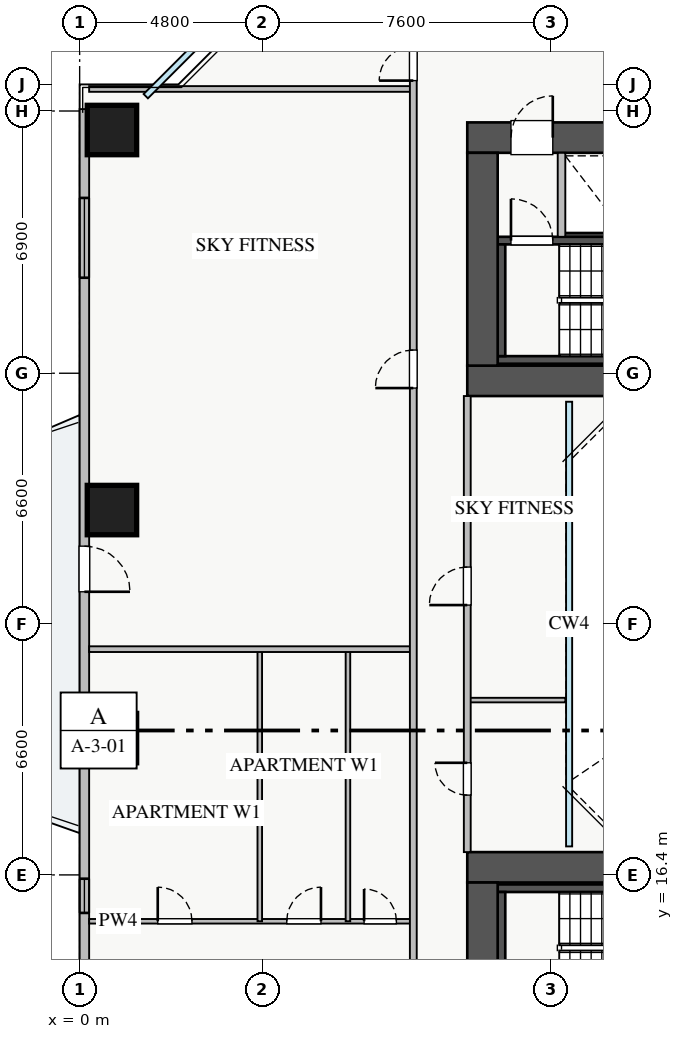
"""IFC4 building model, lengths in metres.
Left out: names, types, materials, properties, quantities, classifications, styles, units other than length and angle.
Written with IfcOpenShell. Run it as: python <this file> out.ifc"""

import sys

from ifc_helpers import new_model, si_unit, direction, frame, frame_2d, origin, origin_2d, place, context, subcontext, project, spatial, rectangle, extrude, source, transform, mapped, element, fill, save


model = new_model("IFC4")
c1 = context("Model", 3, precision=1e-05, world=origin(), true_north=direction((0.0, 1.0)))
c2 = subcontext(c1, "Body", "Model", "MODEL_VIEW")
j1 = project(units=[si_unit("LENGTHUNIT", "METRE"), si_unit("PLANEANGLEUNIT", "RADIAN")], contexts=[c1])
p1 = place(None, origin())
s1 = spatial("IfcSite", under=j1, at=p1, CompositionType="ELEMENT")
p2 = place(p1, origin())
s2 = spatial("IfcBuilding", under=s1, at=p2, CompositionType="ELEMENT")
p3 = place(p2, frame((0.0, 0.0, 23.0)))
s3 = spatial("IfcBuildingStorey", under=s2, at=p3, CompositionType="ELEMENT", Elevation=23.0)
p4 = place(p3, frame((12.68, 33.2, 0.0), z_axis=(0.0, 0.0, 1.0), x_axis=(1.0, 0.0, 0.0)))
e1 = element("IfcWall", 1, at=p4, inside=s3, PredefinedType="SHEAR", context=c2, shape_type="SweptSolid", body=[
    extrude(rectangle(XDim=1.94, YDim=0.18, at=frame_2d((0.97, 0.0))), origin(), (0.0, 0.0, 1.0), 3.07),
])
p5 = place(p3, frame((11.0, 29.95, 0.0), z_axis=(0.0, 0.0, 1.0), x_axis=(1.0, 0.0, 0.0)))
e2 = element("IfcWall", 2, at=p5, inside=s3, PredefinedType="SHEAR", context=c2, shape_type="SweptSolid", body=[
    extrude(rectangle(XDim=7.15, YDim=0.2, at=frame_2d((3.575, 0.0))), origin(), (0.0, 0.0, 1.0), 3.25),
])
p6 = place(p3, frame((11.0, 33.09, 0.0), z_axis=(0.0, 0.0, 1.0), x_axis=(1.0, 0.0, 0.0)))
e3 = element("IfcWall", 3, at=p6, inside=s3, PredefinedType="SHEAR", context=c2, shape_type="SweptSolid", body=[
    extrude(rectangle(XDim=7.15, YDim=0.2, at=frame_2d((3.575, 0.0))), origin(), (0.0, 0.0, 1.0), 3.25),
])
p7 = place(p6, frame((0.35, 0.0, 0.0)))
e4 = element("IfcOpeningElement", 4, at=p7, cuts=e3, PredefinedType="OPENING", context=c2, shape_type="SweptSolid", body=[
    extrude(rectangle(XDim=1.1, YDim=2.05, at=frame_2d((0.55, 1.025))), frame((0.0, 0.11, 0.0), z_axis=(0.0, -1.0, 0.0), x_axis=(1.0, 0.0, 0.0)), (0.0, 0.0, 1.0), 0.22),
])
p8 = place(p3, frame((11.1, 30.05, 0.0), z_axis=(0.0, 0.0, 1.0), x_axis=(0.0, 1.0, 0.0)))
e5 = element("IfcWall", 5, at=p8, inside=s3, PredefinedType="SHEAR", context=c2, shape_type="SweptSolid", body=[
    extrude(rectangle(XDim=2.94, YDim=0.2, at=frame_2d((1.47, 0.0))), origin(), (0.0, 0.0, 1.0), 3.25),
])
p9 = place(p3, frame((11.0, 16.05, 0.0), z_axis=(0.0, 0.0, 1.0), x_axis=(1.0, 0.0, 0.0)))
e6 = element("IfcWall", 6, at=p9, inside=s3, PredefinedType="SHEAR", context=c2, shape_type="SweptSolid", body=[
    extrude(rectangle(XDim=7.15, YDim=0.2, at=frame_2d((3.575, 0.0))), origin(), (0.0, 0.0, 1.0), 3.25),
])
p10 = place(p3, frame((11.1, 13.01, 0.0), z_axis=(0.0, 0.0, 1.0), x_axis=(0.0, 1.0, 0.0)))
e7 = element("IfcWall", 7, at=p10, inside=s3, PredefinedType="SHEAR", context=c2, shape_type="SweptSolid", body=[
    extrude(rectangle(XDim=2.94, YDim=0.2, at=frame_2d((1.47, 0.0))), origin(), (0.0, 0.0, 1.0), 3.25),
])
p11 = place(p3, frame((10.2, 29.4, 0.0), z_axis=(0.0, 0.0, 1.0), x_axis=(1.0, 0.0, 0.0)))
e8 = element("IfcWall", 8, at=p11, inside=s3, PredefinedType="SHEAR", context=c2, shape_type="SweptSolid", body=[
    extrude(rectangle(XDim=17.6, YDim=0.8, at=frame_2d((8.8, 0.0))), origin(), (0.0, 0.0, 1.0), 3.25),
])
p12 = place(p3, frame((10.2, 35.8, 0.0), z_axis=(0.0, 0.0, 1.0), x_axis=(1.0, 0.0, 0.0)))
e9 = element("IfcWall", 9, at=p12, inside=s3, PredefinedType="SHEAR", context=c2, shape_type="SweptSolid", body=[
    extrude(rectangle(XDim=17.6, YDim=0.8, at=frame_2d((8.8, 0.0))), origin(), (0.0, 0.0, 1.0), 3.25),
])
p13 = place(p12, frame((1.15, 0.0, 0.0)))
e10 = element("IfcOpeningElement", 10, at=p13, cuts=e9, PredefinedType="OPENING", context=c2, shape_type="SweptSolid", body=[
    extrude(rectangle(XDim=1.1, YDim=2.05, at=frame_2d((0.55, 1.025))), frame((0.0, 0.41, 0.0), z_axis=(0.0, -1.0, 0.0), x_axis=(1.0, 0.0, 0.0)), (0.0, 0.0, 1.0), 0.82),
])
p14 = place(p12, frame((8.3, 0.0, 0.0)))
e11 = element("IfcOpeningElement", 11, at=p14, cuts=e9, PredefinedType="OPENING", context=c2, shape_type="SweptSolid", body=[
    extrude(rectangle(XDim=1.1, YDim=2.05, at=frame_2d((0.55, 1.025))), frame((0.0, 0.41, 0.0), z_axis=(0.0, -1.0, 0.0), x_axis=(1.0, 0.0, 0.0)), (0.0, 0.0, 1.0), 0.82),
])
p15 = place(p12, frame((10.05, 0.0, 0.0)))
e12 = element("IfcOpeningElement", 12, at=p15, cuts=e9, PredefinedType="OPENING", context=c2, shape_type="SweptSolid", body=[
    extrude(rectangle(XDim=1.1, YDim=2.05, at=frame_2d((0.55, 1.025))), frame((0.0, 0.41, 0.0), z_axis=(0.0, -1.0, 0.0), x_axis=(1.0, 0.0, 0.0)), (0.0, 0.0, 1.0), 0.82),
])
p16 = place(p12, frame((14.74, 0.0, 0.0)))
e13 = element("IfcOpeningElement", 13, at=p16, cuts=e9, PredefinedType="OPENING", context=c2, shape_type="SweptSolid", body=[
    extrude(rectangle(XDim=1.0, YDim=2.05, at=frame_2d((0.5, 1.025))), frame((0.0, 0.41, 0.0), z_axis=(0.0, -1.0, 0.0), x_axis=(1.0, 0.0, 0.0)), (0.0, 0.0, 1.0), 0.82),
])
p17 = place(p12, frame((11.95, 0.0, 0.0)))
e14 = element("IfcOpeningElement", 14, at=p17, cuts=e9, PredefinedType="OPENING", context=c2, shape_type="SweptSolid", body=[
    extrude(rectangle(XDim=1.0, YDim=2.05, at=frame_2d((0.5, 1.025))), frame((0.0, 0.41, 0.0), z_axis=(0.0, -1.0, 0.0), x_axis=(1.0, 0.0, 0.0)), (0.0, 0.0, 1.0), 0.82),
])
p18 = place(p12, frame((13.485, 0.0, 0.0)))
e15 = element("IfcOpeningElement", 15, at=p18, cuts=e9, PredefinedType="OPENING", context=c2, shape_type="SweptSolid", body=[
    extrude(rectangle(XDim=1.0, YDim=2.05, at=frame_2d((0.5, 1.025))), frame((0.0, 0.41, 0.0), z_axis=(0.0, -1.0, 0.0), x_axis=(1.0, 0.0, 0.0)), (0.0, 0.0, 1.0), 0.82),
])
p19 = place(p3, frame((10.6, 29.8, 0.0), z_axis=(0.0, 0.0, 1.0), x_axis=(0.0, 1.0, 0.0)))
e16 = element("IfcWall", 16, at=p19, inside=s3, PredefinedType="SHEAR", context=c2, shape_type="SweptSolid", body=[
    extrude(rectangle(XDim=5.6, YDim=0.8, at=frame_2d((2.8, 0.0))), origin(), (0.0, 0.0, 1.0), 3.25),
])
p20 = place(p3, frame((10.2, 16.6, 0.0), z_axis=(0.0, 0.0, 1.0), x_axis=(1.0, 0.0, 0.0)))
e17 = element("IfcWall", 17, at=p20, inside=s3, PredefinedType="SHEAR", context=c2, shape_type="SweptSolid", body=[
    extrude(rectangle(XDim=17.6, YDim=0.8, at=frame_2d((8.8, 0.0))), origin(), (0.0, 0.0, 1.0), 3.25),
])
p21 = place(p3, frame((10.6, 10.6, 0.0), z_axis=(0.0, 0.0, 1.0), x_axis=(0.0, 1.0, 0.0)))
e18 = element("IfcWall", 18, at=p21, inside=s3, PredefinedType="SHEAR", context=c2, shape_type="SweptSolid", body=[
    extrude(rectangle(XDim=5.6, YDim=0.8, at=frame_2d((2.8, 0.0))), origin(), (0.0, 0.0, 1.0), 3.25),
])
m1 = source(origin(), c2, "Body", "SweptSolid", [
    extrude(rectangle(XDim=1.3, YDim=1.3, at=origin_2d()), origin(), (0.0, 0.0, 1.0), 3.25),
])
for number, where, z_axis, x_axis in (
    (19, (0.85, 36.0, 0.0), (0.0, 0.0, 1.0), (1.0, 0.0, 0.0)),
    (20, (0.85, 26.0, 0.0), (0.0, 0.0, 1.0), (1.0, 0.0, 0.0)),
    (21, (0.85, 20.0, 0.0), (0.0, 0.0, 1.0), (1.0, 0.0, 0.0)),
):
    element("IfcColumn", number, at=place(p3, frame(where, z_axis=z_axis, x_axis=x_axis)), inside=s3, PredefinedType="COLUMN", context=c2, shape_type="MappedRepresentation", body=[
        mapped(m1, transform((0.0, 0.0, 0.0), x_axis=(1.0, 0.0, 0.0), y_axis=(0.0, 1.0, 0.0), z_axis=(0.0, 0.0, 1.0), scale=1.0)),
    ])
p22 = place(p3, frame((0.125, 9.45, 0.0), z_axis=(0.0, 0.0, 1.0), x_axis=(0.0, 1.0, 0.0)))
e22 = element("IfcWall", 22, at=p22, inside=s3, PredefinedType="STANDARD", context=c2, shape_type="SweptSolid", body=[
    extrude(rectangle(XDim=27.1, YDim=0.25, at=frame_2d((13.55, 0.0))), origin(), (0.0, 0.0, 1.0), 2.61),
])
p23 = place(p22, frame((14.4, 0.0, 0.0)))
e23 = element("IfcOpeningElement", 23, at=p23, cuts=e22, PredefinedType="OPENING", context=c2, shape_type="SweptSolid", body=[
    extrude(rectangle(XDim=1.2, YDim=2.1, at=frame_2d((0.6, 1.05))), frame((0.0, 0.135, 0.0), z_axis=(0.0, -1.0, 0.0), x_axis=(1.0, 0.0, 0.0)), (0.0, 0.0, 1.0), 0.27),
])
p24 = place(p22, frame((2.188, 0.0, 0.9)))
e24 = element("IfcOpeningElement", 24, at=p24, cuts=e22, PredefinedType="OPENING", context=c2, shape_type="SweptSolid", body=[
    extrude(rectangle(XDim=2.4, YDim=1.48, at=frame_2d((1.2, 0.74))), frame((0.0, 0.135, 0.0), z_axis=(0.0, -1.0, 0.0), x_axis=(1.0, 0.0, 0.0)), (0.0, 0.0, 1.0), 0.27),
])
p25 = place(p22, frame((22.663, 0.0, 0.9)))
e25 = element("IfcOpeningElement", 25, at=p25, cuts=e22, PredefinedType="OPENING", context=c2, shape_type="SweptSolid", body=[
    extrude(rectangle(XDim=2.1, YDim=1.48, at=frame_2d((1.05, 0.74))), frame((0.0, 0.135, 0.0), z_axis=(0.0, -1.0, 0.0), x_axis=(1.0, 0.0, 0.0)), (0.0, 0.0, 1.0), 0.27),
])
p26 = place(p22, frame((5.95, 0.0, 0.9)))
e26 = element("IfcOpeningElement", 26, at=p26, cuts=e22, PredefinedType="OPENING", context=c2, shape_type="SweptSolid", body=[
    extrude(rectangle(XDim=0.9, YDim=1.2, at=frame_2d((0.45, 0.6))), frame((0.0, 0.135, 0.0), z_axis=(0.0, -1.0, 0.0), x_axis=(1.0, 0.0, 0.0)), (0.0, 0.0, 1.0), 0.27),
])
p27 = place(p3, frame((12.68, 33.19, 0.0), z_axis=(0.0, 0.0, 1.0), x_axis=(0.0, 1.0, 0.0)))
e27 = element("IfcWall", 27, at=p27, inside=s3, PredefinedType="PARTITIONING", context=c2, shape_type="SweptSolid", body=[
    extrude(rectangle(XDim=2.21, YDim=0.2, at=frame_2d((1.105, 0.0))), origin(), (0.0, 0.0, 1.0), 3.07),
])
p28 = place(p3, frame((0.25, 37.08, 0.0), z_axis=(0.0, 0.0, 1.0), x_axis=(1.0, 0.0, 0.0)))
e28 = element("IfcWall", 28, at=p28, inside=s3, PredefinedType="PARTITIONING", context=c2, shape_type="SweptSolid", body=[
    extrude(rectangle(XDim=8.53, YDim=0.15, at=frame_2d((4.265, 0.0))), origin(), (0.0, 0.0, 1.0), 3.07),
])
p29 = place(p3, frame((0.25, 15.18, 0.0), z_axis=(0.0, 0.0, 1.0), x_axis=(1.0, 0.0, 0.0)))
e29 = element("IfcWall", 29, at=p29, inside=s3, PredefinedType="PLUMBINGWALL", context=c2, shape_type="SweptSolid", body=[
    extrude(rectangle(XDim=8.53, YDim=0.12, at=frame_2d((4.265, 0.0))), origin(), (0.0, 0.0, 1.0), 3.07),
])
p30 = place(p29, frame((1.805, 0.0, 0.0)))
e30 = element("IfcOpeningElement", 30, at=p30, cuts=e29, PredefinedType="OPENING", context=c2, shape_type="SweptSolid", body=[
    extrude(rectangle(XDim=0.9, YDim=2.05, at=frame_2d((0.45, 1.025))), frame((0.0, 0.07, 0.0), z_axis=(0.0, -1.0, 0.0), x_axis=(1.0, 0.0, 0.0)), (0.0, 0.0, 1.0), 0.14),
])
p31 = place(p29, frame((5.2, 0.0, 0.0)))
e31 = element("IfcOpeningElement", 31, at=p31, cuts=e29, PredefinedType="OPENING", context=c2, shape_type="SweptSolid", body=[
    extrude(rectangle(XDim=0.9, YDim=2.05, at=frame_2d((0.45, 1.025))), frame((0.0, 0.07, 0.0), z_axis=(0.0, -1.0, 0.0), x_axis=(1.0, 0.0, 0.0)), (0.0, 0.0, 1.0), 0.14),
])
p32 = place(p29, frame((7.235, 0.0, 0.0)))
e32 = element("IfcOpeningElement", 32, at=p32, cuts=e29, PredefinedType="OPENING", context=c2, shape_type="SweptSolid", body=[
    extrude(rectangle(XDim=0.85, YDim=2.05, at=frame_2d((0.425, 1.025))), frame((0.0, 0.07, 0.0), z_axis=(0.0, -1.0, 0.0), x_axis=(1.0, 0.0, 0.0)), (0.0, 0.0, 1.0), 0.14),
])
for number, where, z_axis, x_axis in (
    (33, (4.74, 15.18, 0.0), (0.0, 0.0, 1.0), (0.0, 1.0, 0.0)),
    (34, (7.06, 15.18, 0.0), (0.0, 0.0, 1.0), (0.0, 1.0, 0.0)),
):
    element("IfcWall", number, at=place(p3, frame(where, z_axis=z_axis, x_axis=x_axis)), inside=s3, PredefinedType="PLUMBINGWALL", context=c2, shape_type="SweptSolid", body=[
        extrude(rectangle(XDim=7.16, YDim=0.12, at=frame_2d((3.58, 0.0))), origin(), (0.0, 0.0, 1.0), 3.07),
    ])
p33 = place(p3, frame((0.25, 22.34, 0.0), z_axis=(0.0, 0.0, 1.0), x_axis=(1.0, 0.0, 0.0)))
e35 = element("IfcWall", 35, at=p33, inside=s3, PredefinedType="PARTITIONING", context=c2, shape_type="SweptSolid", body=[
    extrude(rectangle(XDim=8.53, YDim=0.15, at=frame_2d((4.265, 0.0))), origin(), (0.0, 0.0, 1.0), 3.07),
])
p34 = place(p3, frame((8.78, 7.21, 0.0), z_axis=(0.0, 0.0, 1.0), x_axis=(0.0, 1.0, 0.0)))
e36 = element("IfcWall", 36, at=p34, inside=s3, PredefinedType="PARTITIONING", context=c2, shape_type="SweptSolid", body=[
    extrude(rectangle(XDim=31.23, YDim=0.18, at=frame_2d((15.615, 0.0))), origin(), (0.0, 0.0, 1.0), 3.07),
])
p35 = place(p34, frame((30.09, 0.0, 0.0)))
e37 = element("IfcOpeningElement", 37, at=p35, cuts=e36, PredefinedType="OPENING", context=c2, shape_type="SweptSolid", body=[
    extrude(rectangle(XDim=0.9, YDim=2.05, at=frame_2d((0.45, 1.025))), frame((0.0, 0.1, 0.0), z_axis=(0.0, -1.0, 0.0), x_axis=(1.0, 0.0, 0.0)), (0.0, 0.0, 1.0), 0.2),
])
p36 = place(p34, frame((0.24, 0.0, 0.0)))
e38 = element("IfcOpeningElement", 38, at=p36, cuts=e36, PredefinedType="OPENING", context=c2, shape_type="SweptSolid", body=[
    extrude(rectangle(XDim=0.9, YDim=2.05, at=frame_2d((0.45, 1.025))), frame((0.0, 0.1, 0.0), z_axis=(0.0, -1.0, 0.0), x_axis=(1.0, 0.0, 0.0)), (0.0, 0.0, 1.0), 0.2),
])
p37 = place(p34, frame((3.975, 0.0, 0.0)))
e39 = element("IfcOpeningElement", 39, at=p37, cuts=e36, PredefinedType="OPENING", context=c2, shape_type="SweptSolid", body=[
    extrude(rectangle(XDim=1.0, YDim=2.05, at=frame_2d((0.5, 1.025))), frame((0.0, 0.1, 0.0), z_axis=(0.0, -1.0, 0.0), x_axis=(1.0, 0.0, 0.0)), (0.0, 0.0, 1.0), 0.2),
])
p38 = place(p34, frame((22.0, 0.0, 0.0)))
e40 = element("IfcOpeningElement", 40, at=p38, cuts=e36, PredefinedType="OPENING", context=c2, shape_type="SweptSolid", body=[
    extrude(rectangle(XDim=1.0, YDim=2.05, at=frame_2d((0.5, 1.025))), frame((0.0, 0.1, 0.0), z_axis=(0.0, -1.0, 0.0), x_axis=(1.0, 0.0, 0.0)), (0.0, 0.0, 1.0), 0.2),
])
p39 = place(p3, frame((10.2, 21.0, 0.0), z_axis=(0.0, 0.0, 1.0), x_axis=(1.0, 0.0, 0.0)))
e41 = element("IfcWall", 41, at=p39, inside=s3, PredefinedType="PLUMBINGWALL", context=c2, shape_type="SweptSolid", body=[
    extrude(rectangle(XDim=2.58, YDim=0.12, at=frame_2d((1.29, 0.0))), origin(), (0.0, 0.0, 1.0), 3.07),
])
p40 = place(p3, frame((10.2, 17.0, 0.0), z_axis=(0.0, 0.0, 1.0), x_axis=(0.0, 1.0, 0.0)))
e42 = element("IfcWall", 42, at=p40, inside=s3, PredefinedType="PARTITIONING", context=c2, shape_type="SweptSolid", body=[
    extrude(rectangle(XDim=12.0, YDim=0.18, at=frame_2d((6.0, 0.0))), origin(), (0.0, 0.0, 1.0), 3.07),
])
p41 = place(p40, frame((1.5, 0.0, 0.0)))
e43 = element("IfcOpeningElement", 43, at=p41, cuts=e42, PredefinedType="OPENING", context=c2, shape_type="SweptSolid", body=[
    extrude(rectangle(XDim=0.85, YDim=2.05, at=frame_2d((0.425, 1.025))), frame((0.0, 0.1, 0.0), z_axis=(0.0, -1.0, 0.0), x_axis=(1.0, 0.0, 0.0)), (0.0, 0.0, 1.0), 0.2),
])
p42 = place(p40, frame((6.5, 0.0, 0.0)))
e44 = element("IfcOpeningElement", 44, at=p42, cuts=e42, PredefinedType="OPENING", context=c2, shape_type="SweptSolid", body=[
    extrude(rectangle(XDim=1.0, YDim=2.05, at=frame_2d((0.5, 1.025))), frame((0.0, 0.1, 0.0), z_axis=(0.0, -1.0, 0.0), x_axis=(1.0, 0.0, 0.0)), (0.0, 0.0, 1.0), 0.2),
])
m2 = source(origin(), c2, "Body", "SweptSolid", [
    extrude(rectangle(XDim=1.2, YDim=2.1, at=frame_2d((0.6, 1.05))), frame((0.0, 0.025, 0.0), z_axis=(0.0, -1.0, 0.0), x_axis=(1.0, 0.0, 0.0)), (0.0, 0.0, 1.0), 0.05),
])
p43 = place(p23, frame((1.2, 0.0, 0.0), z_axis=(0.0, 0.0, 1.0), x_axis=(-1.0, 0.0, 0.0)))
e45 = element("IfcDoor", 45, at=p43, inside=s3, OperationType="SINGLE_SWING_LEFT", PredefinedType="DOOR", context=c2, shape_type="MappedRepresentation", body=[
    mapped(m2, transform((0.0, 0.0, 0.0), x_axis=(1.0, 0.0, 0.0), y_axis=(0.0, 1.0, 0.0), z_axis=(0.0, 0.0, 1.0), scale=1.0)),
])
fill(e23, e45)
m3 = source(origin(), c2, "Body", "SweptSolid", [
    extrude(rectangle(XDim=2.1, YDim=1.48, at=frame_2d((1.05, 0.74))), frame((0.0, 0.03, 0.0), z_axis=(0.0, -1.0, 0.0), x_axis=(1.0, 0.0, 0.0)), (0.0, 0.0, 1.0), 0.06),
])
p44 = place(p25, origin())
e46 = element("IfcWindow", 46, at=p44, inside=s3, PartitioningType="TRIPLE_PANEL_VERTICAL", PredefinedType="WINDOW", context=c2, shape_type="MappedRepresentation", body=[
    mapped(m3, transform((0.0, 0.0, 0.0), x_axis=(1.0, 0.0, 0.0), y_axis=(0.0, 1.0, 0.0), z_axis=(0.0, 0.0, 1.0), scale=1.0)),
])
fill(e25, e46)
m4 = source(origin(), c2, "Body", "SweptSolid", [
    extrude(rectangle(XDim=1.1, YDim=2.05, at=frame_2d((0.55, 1.025))), frame((0.0, 0.025, 0.0), z_axis=(0.0, -1.0, 0.0), x_axis=(1.0, 0.0, 0.0)), (0.0, 0.0, 1.0), 0.05),
])
p45 = place(p13, origin())
e47 = element("IfcDoor", 47, at=p45, inside=s3, OperationType="SINGLE_SWING_RIGHT", PredefinedType="DOOR", context=c2, shape_type="MappedRepresentation", body=[
    mapped(m4, transform((0.0, 0.0, 0.0), x_axis=(1.0, 0.0, 0.0), y_axis=(0.0, 1.0, 0.0), z_axis=(0.0, 0.0, 1.0), scale=1.0)),
])
fill(e10, e47)
p46 = place(p7, origin())
e48 = element("IfcDoor", 48, at=p46, inside=s3, OperationType="SINGLE_SWING_LEFT", PredefinedType="DOOR", context=c2, shape_type="MappedRepresentation", body=[
    mapped(m4, transform((0.0, 0.0, 0.0), x_axis=(1.0, 0.0, 0.0), y_axis=(0.0, 1.0, 0.0), z_axis=(0.0, 0.0, 1.0), scale=1.0)),
])
fill(e4, e48)
m5 = source(origin(), c2, "Body", "SweptSolid", [
    extrude(rectangle(XDim=0.9, YDim=2.05, at=frame_2d((0.45, 1.025))), frame((0.0, 0.025, 0.0), z_axis=(0.0, -1.0, 0.0), x_axis=(1.0, 0.0, 0.0)), (0.0, 0.0, 1.0), 0.05),
])
p47 = place(p30, origin())
e49 = element("IfcDoor", 49, at=p47, inside=s3, OperationType="SINGLE_SWING_LEFT", PredefinedType="DOOR", context=c2, shape_type="MappedRepresentation", body=[
    mapped(m5, transform((0.0, 0.0, 0.0), x_axis=(1.0, 0.0, 0.0), y_axis=(0.0, 1.0, 0.0), z_axis=(0.0, 0.0, 1.0), scale=1.0)),
])
fill(e30, e49)
p48 = place(p31, origin())
e50 = element("IfcDoor", 50, at=p48, inside=s3, OperationType="SINGLE_SWING_RIGHT", PredefinedType="DOOR", context=c2, shape_type="MappedRepresentation", body=[
    mapped(m5, transform((0.0, 0.0, 0.0), x_axis=(1.0, 0.0, 0.0), y_axis=(0.0, 1.0, 0.0), z_axis=(0.0, 0.0, 1.0), scale=1.0)),
])
fill(e31, e50)
m6 = source(origin(), c2, "Body", "SweptSolid", [
    extrude(rectangle(XDim=0.85, YDim=2.05, at=frame_2d((0.425, 1.025))), frame((0.0, 0.025, 0.0), z_axis=(0.0, -1.0, 0.0), x_axis=(1.0, 0.0, 0.0)), (0.0, 0.0, 1.0), 0.05),
])
p49 = place(p32, origin())
e51 = element("IfcDoor", 51, at=p49, inside=s3, OperationType="SINGLE_SWING_LEFT", PredefinedType="DOOR", context=c2, shape_type="MappedRepresentation", body=[
    mapped(m6, transform((0.0, 0.0, 0.0), x_axis=(1.0, 0.0, 0.0), y_axis=(0.0, 1.0, 0.0), z_axis=(0.0, 0.0, 1.0), scale=1.0)),
])
fill(e32, e51)
p50 = place(p35, origin())
e52 = element("IfcDoor", 52, at=p50, inside=s3, OperationType="SINGLE_SWING_LEFT", PredefinedType="DOOR", context=c2, shape_type="MappedRepresentation", body=[
    mapped(m5, transform((0.0, 0.0, 0.0), x_axis=(1.0, 0.0, 0.0), y_axis=(0.0, 1.0, 0.0), z_axis=(0.0, 0.0, 1.0), scale=1.0)),
])
fill(e37, e52)
m7 = source(origin(), c2, "Body", "SweptSolid", [
    extrude(rectangle(XDim=1.0, YDim=2.05, at=frame_2d((0.5, 1.025))), frame((0.0, 0.025, 0.0), z_axis=(0.0, -1.0, 0.0), x_axis=(1.0, 0.0, 0.0)), (0.0, 0.0, 1.0), 0.05),
])
p51 = place(p38, origin())
e53 = element("IfcDoor", 53, at=p51, inside=s3, OperationType="SINGLE_SWING_LEFT", PredefinedType="DOOR", context=c2, shape_type="MappedRepresentation", body=[
    mapped(m7, transform((0.0, 0.0, 0.0), x_axis=(1.0, 0.0, 0.0), y_axis=(0.0, 1.0, 0.0), z_axis=(0.0, 0.0, 1.0), scale=1.0)),
])
fill(e40, e53)
p52 = place(p41, origin())
e54 = element("IfcDoor", 54, at=p52, inside=s3, OperationType="SINGLE_SWING_RIGHT", PredefinedType="DOOR", context=c2, shape_type="MappedRepresentation", body=[
    mapped(m6, transform((0.0, 0.0, 0.0), x_axis=(1.0, 0.0, 0.0), y_axis=(0.0, 1.0, 0.0), z_axis=(0.0, 0.0, 1.0), scale=1.0)),
])
fill(e43, e54)
p53 = place(p42, origin())
e55 = element("IfcDoor", 55, at=p53, inside=s3, OperationType="SINGLE_SWING_LEFT", PredefinedType="DOOR", context=c2, shape_type="MappedRepresentation", body=[
    mapped(m7, transform((0.0, 0.0, 0.0), x_axis=(1.0, 0.0, 0.0), y_axis=(0.0, 1.0, 0.0), z_axis=(0.0, 0.0, 1.0), scale=1.0)),
])
fill(e44, e55)
m8 = source(origin(), c2, "Body", "SweptSolid", [
    extrude(rectangle(XDim=0.9, YDim=1.2, at=frame_2d((0.45, 0.6))), frame((0.0, 0.03, 0.0), z_axis=(0.0, -1.0, 0.0), x_axis=(1.0, 0.0, 0.0)), (0.0, 0.0, 1.0), 0.06),
])
p54 = place(p26, origin())
e56 = element("IfcWindow", 56, at=p54, inside=s3, PartitioningType="SINGLE_PANEL", PredefinedType="WINDOW", context=c2, shape_type="MappedRepresentation", body=[
    mapped(m8, transform((0.0, 0.0, 0.0), x_axis=(1.0, 0.0, 0.0), y_axis=(0.0, 1.0, 0.0), z_axis=(0.0, 0.0, 1.0), scale=1.0)),
])
fill(e26, e56)
save(model, sys.argv[1])
